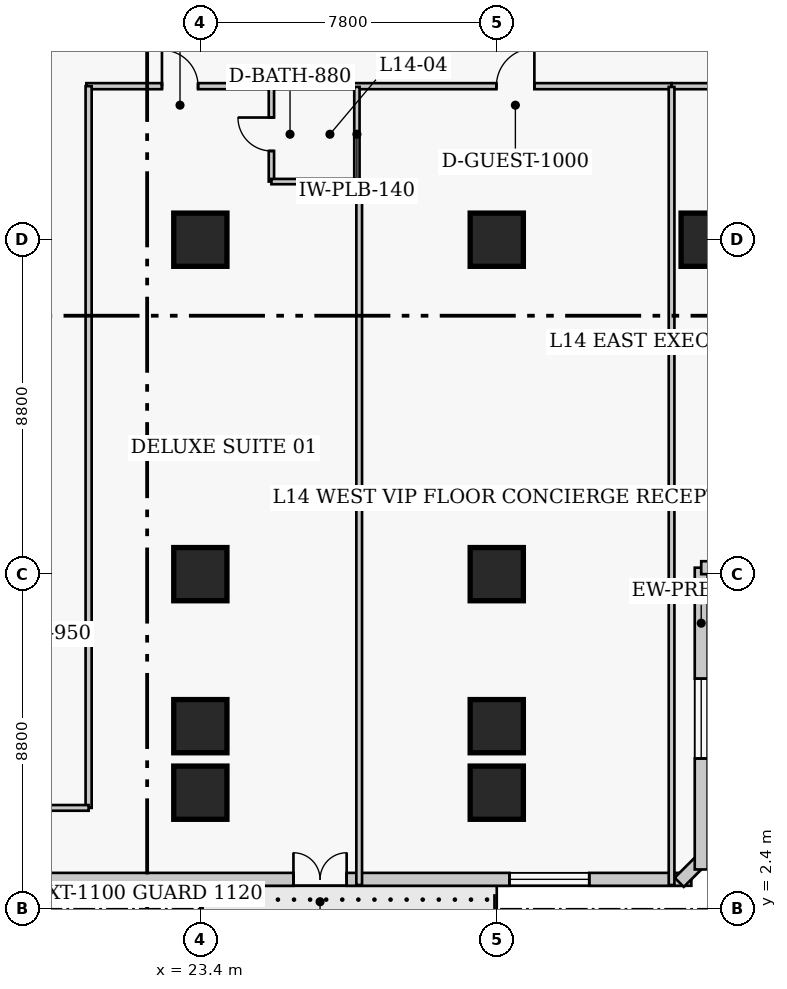
"""IFC4 building model, lengths in metres.
Left out: names, types, materials, properties, quantities, classifications, styles, units other than length and angle.
Written with IfcOpenShell. Run it as: python <this file> out.ifc"""

import sys

from ifc_helpers import new_model, si_unit, direction, frame, frame_2d, origin, origin_2d, place, context, subcontext, project, spatial, rectangle, extrude, element, fill, save


model = new_model("IFC4")
c1 = context("Model", 3, precision=1e-05, world=origin(), true_north=direction((0.0, 1.0)))
c2 = subcontext(c1, "Body", "Model", "MODEL_VIEW")
j1 = project(units=[si_unit("LENGTHUNIT", "METRE"), si_unit("PLANEANGLEUNIT", "RADIAN")], contexts=[c1])
p1 = place(None, origin())
s1 = spatial("IfcSite", under=j1, at=p1, CompositionType="ELEMENT")
p2 = place(p1, origin())
s2 = spatial("IfcBuilding", under=s1, at=p2, CompositionType="ELEMENT")
p3 = place(p2, frame((0.0, 0.0, 60.2)))
s3 = spatial("IfcBuildingStorey", under=s2, at=p3, CompositionType="ELEMENT", Elevation=60.2)
for number, where, z_axis, x_axis in (
    (1, (23.4, 11.2, 0.0), (0.0, 0.0, 1.0), (1.0, 0.0, 0.0)),
    (2, (23.4, 20.0, 0.0), (0.0, 0.0, 1.0), (1.0, 0.0, 0.0)),
    (3, (31.2, 11.2, 0.0), (0.0, 0.0, 1.0), (1.0, 0.0, 0.0)),
    (4, (31.2, 20.0, 0.0), (0.0, 0.0, 1.0), (1.0, 0.0, 0.0)),
    (5, (36.75, 20.0, 0.0), (0.0, 0.0, 1.0), (1.0, 0.0, 0.0)),
    (6, (23.4, 7.2, 0.0), (0.0, 0.0, 1.0), (1.0, 0.0, 0.0)),
    (7, (31.2, 7.2, 0.0), (0.0, 0.0, 1.0), (1.0, 0.0, 0.0)),
    (8, (23.4, 5.45, 0.0), (0.0, 0.0, 1.0), (1.0, 0.0, 0.0)),
    (9, (31.2, 5.45, 0.0), (0.0, 0.0, 1.0), (1.0, 0.0, 0.0)),
):
    element("IfcColumn", number, at=place(p3, frame(where, z_axis=z_axis, x_axis=x_axis)), inside=s3, PredefinedType="COLUMN", context=c2, shape_type="SweptSolid", body=[
        extrude(rectangle(XDim=1.4, YDim=1.4, at=origin_2d()), origin(), (0.0, 0.0, 1.0), 3.8),
    ])
p4 = place(p3, frame((6.43, 3.17, 0.0), z_axis=(0.0, 0.0, 1.0), x_axis=(1.0, 0.0, 0.0)))
e10 = element("IfcWall", 10, at=p4, inside=s3, PredefinedType="SOLIDWALL", context=c2, shape_type="SweptSolid", body=[
    extrude(rectangle(XDim=29.89, YDim=0.34, at=frame_2d((14.945, 0.0))), origin(), (0.0, 0.0, 1.0), 3.54),
])
p5 = place(p4, frame((19.42, 0.0, 0.0)))
e11 = element("IfcOpeningElement", 11, at=p5, cuts=e10, PredefinedType="OPENING", context=c2, shape_type="SweptSolid", body=[
    extrude(rectangle(XDim=1.4, YDim=2.15, at=frame_2d((0.7, 1.075))), frame((0.0, 0.18, 0.0), z_axis=(0.0, -1.0, 0.0), x_axis=(1.0, 0.0, 0.0)), (0.0, 0.0, 1.0), 0.36),
])
p6 = place(p4, frame((2.686, 0.0, 0.85)))
e12 = element("IfcOpeningElement", 12, at=p6, cuts=e10, PredefinedType="OPENING", context=c2, shape_type="SweptSolid", body=[
    extrude(rectangle(XDim=2.1, YDim=1.85, at=frame_2d((1.05, 0.925))), frame((0.0, 0.18, 0.0), z_axis=(0.0, -1.0, 0.0), x_axis=(1.0, 0.0, 0.0)), (0.0, 0.0, 1.0), 0.36),
])
p7 = place(p4, frame((9.009, 0.0, 0.85)))
e13 = element("IfcOpeningElement", 13, at=p7, cuts=e10, PredefinedType="OPENING", context=c2, shape_type="SweptSolid", body=[
    extrude(rectangle(XDim=2.1, YDim=1.85, at=frame_2d((1.05, 0.925))), frame((0.0, 0.18, 0.0), z_axis=(0.0, -1.0, 0.0), x_axis=(1.0, 0.0, 0.0)), (0.0, 0.0, 1.0), 0.36),
])
p8 = place(p4, frame((25.104, 0.0, 0.85)))
e14 = element("IfcOpeningElement", 14, at=p8, cuts=e10, PredefinedType="OPENING", context=c2, shape_type="SweptSolid", body=[
    extrude(rectangle(XDim=2.1, YDim=1.85, at=frame_2d((1.05, 0.925))), frame((0.0, 0.18, 0.0), z_axis=(0.0, -1.0, 0.0), x_axis=(1.0, 0.0, 0.0)), (0.0, 0.0, 1.0), 0.36),
])
p9 = place(p3, frame((36.001, 3.092, 0.0), z_axis=(0.0, 0.0, 1.0), x_axis=(0.707106781187, 0.707106781187, 0.0)))
e15 = element("IfcWall", 15, at=p9, inside=s3, PredefinedType="SOLIDWALL", context=c2, shape_type="SweptSolid", body=[
    extrude(rectangle(XDim=0.929, YDim=0.34, at=frame_2d((0.464, 0.0))), origin(), (0.0, 0.0, 1.0), 3.54),
])
p10 = place(p3, frame((36.58, 3.43, 0.0), z_axis=(0.0, 0.0, 1.0), x_axis=(0.0, 1.0, 0.0)))
e16 = element("IfcWall", 16, at=p10, inside=s3, PredefinedType="SOLIDWALL", context=c2, shape_type="SweptSolid", body=[
    extrude(rectangle(XDim=7.94, YDim=0.34, at=frame_2d((3.97, 0.0))), origin(), (0.0, 0.0, 1.0), 3.54),
])
p11 = place(p10, frame((2.92, 0.0, 0.85)))
e17 = element("IfcOpeningElement", 17, at=p11, cuts=e16, PredefinedType="OPENING", context=c2, shape_type="SweptSolid", body=[
    extrude(rectangle(XDim=2.1, YDim=1.85, at=frame_2d((1.05, 0.925))), frame((0.0, 0.18, 0.0), z_axis=(0.0, -1.0, 0.0), x_axis=(1.0, 0.0, 0.0)), (0.0, 0.0, 1.0), 0.36),
])
p12 = place(p3, frame((36.58, 11.37, 0.0), z_axis=(0.0, 0.0, 1.0), x_axis=(1.0, 0.0, 0.0)))
e18 = element("IfcWall", 18, at=p12, inside=s3, PredefinedType="SOLIDWALL", context=c2, shape_type="SweptSolid", body=[
    extrude(rectangle(XDim=4.84, YDim=0.34, at=frame_2d((2.42, 0.0))), origin(), (0.0, 0.0, 1.0), 3.54),
])
p13 = place(p12, frame((1.37, 0.0, 0.85)))
e19 = element("IfcOpeningElement", 19, at=p13, cuts=e18, PredefinedType="OPENING", context=c2, shape_type="SweptSolid", body=[
    extrude(rectangle(XDim=2.1, YDim=1.85, at=frame_2d((1.05, 0.925))), frame((0.0, 0.18, 0.0), z_axis=(0.0, -1.0, 0.0), x_axis=(1.0, 0.0, 0.0)), (0.0, 0.0, 1.0), 0.36),
])
p14 = place(p3, frame((20.4, 24.04, 0.0), z_axis=(0.0, 0.0, 1.0), x_axis=(1.0, 0.0, 0.0)))
e20 = element("IfcWall", 20, at=p14, inside=s3, PredefinedType="PARTITIONING", context=c2, shape_type="SweptSolid", body=[
    extrude(rectangle(XDim=15.4, YDim=0.16, at=frame_2d((7.7, 0.0))), origin(), (0.0, 0.0, 1.0), 3.54),
])
p15 = place(p14, frame((1.99, 0.0, 0.0)))
e21 = element("IfcOpeningElement", 21, at=p15, cuts=e20, PredefinedType="OPENING", context=c2, shape_type="SweptSolid", body=[
    extrude(rectangle(XDim=0.95, YDim=2.1, at=frame_2d((0.475, 1.05))), frame((0.0, 0.09, 0.0), z_axis=(0.0, -1.0, 0.0), x_axis=(1.0, 0.0, 0.0)), (0.0, 0.0, 1.0), 0.18),
])
p16 = place(p14, frame((10.79, 0.0, 0.0)))
e22 = element("IfcOpeningElement", 22, at=p16, cuts=e20, PredefinedType="OPENING", context=c2, shape_type="SweptSolid", body=[
    extrude(rectangle(XDim=1.0, YDim=2.15, at=frame_2d((0.5, 1.075))), frame((0.0, 0.09, 0.0), z_axis=(0.0, -1.0, 0.0), x_axis=(1.0, 0.0, 0.0)), (0.0, 0.0, 1.0), 0.18),
])
p17 = place(p3, frame((35.8, 24.04, 0.0), z_axis=(0.0, 0.0, 1.0), x_axis=(1.0, 0.0, 0.0)))
e23 = element("IfcWall", 23, at=p17, inside=s3, PredefinedType="PARTITIONING", context=c2, shape_type="SweptSolid", body=[
    extrude(rectangle(XDim=23.5, YDim=0.16, at=frame_2d((11.75, 0.0))), origin(), (0.0, 0.0, 1.0), 3.54),
])
p18 = place(p17, frame((2.705, 0.0, 0.0)))
e24 = element("IfcOpeningElement", 24, at=p18, cuts=e23, PredefinedType="OPENING", context=c2, shape_type="SweptSolid", body=[
    extrude(rectangle(XDim=1.0, YDim=2.15, at=frame_2d((0.5, 1.075))), frame((0.0, 0.09, 0.0), z_axis=(0.0, -1.0, 0.0), x_axis=(1.0, 0.0, 0.0)), (0.0, 0.0, 1.0), 0.18),
])
p19 = place(p17, frame((10.02, 0.0, 0.0)))
e25 = element("IfcOpeningElement", 25, at=p19, cuts=e23, PredefinedType="OPENING", context=c2, shape_type="SweptSolid", body=[
    extrude(rectangle(XDim=0.95, YDim=2.1, at=frame_2d((0.475, 1.05))), frame((0.0, 0.09, 0.0), z_axis=(0.0, -1.0, 0.0), x_axis=(1.0, 0.0, 0.0)), (0.0, 0.0, 1.0), 0.18),
])
p20 = place(p17, frame((15.88, 0.0, 0.0)))
e26 = element("IfcOpeningElement", 26, at=p20, cuts=e23, PredefinedType="OPENING", context=c2, shape_type="SweptSolid", body=[
    extrude(rectangle(XDim=0.95, YDim=2.1, at=frame_2d((0.475, 1.05))), frame((0.0, 0.09, 0.0), z_axis=(0.0, -1.0, 0.0), x_axis=(1.0, 0.0, 0.0)), (0.0, 0.0, 1.0), 0.18),
])
p21 = place(p17, frame((19.155, 0.0, 0.0)))
e27 = element("IfcOpeningElement", 27, at=p21, cuts=e23, PredefinedType="OPENING", context=c2, shape_type="SweptSolid", body=[
    extrude(rectangle(XDim=0.95, YDim=2.1, at=frame_2d((0.475, 1.05))), frame((0.0, 0.09, 0.0), z_axis=(0.0, -1.0, 0.0), x_axis=(1.0, 0.0, 0.0)), (0.0, 0.0, 1.0), 0.18),
])
p22 = place(p3, frame((20.46, 5.05, 0.0), z_axis=(0.0, 0.0, 1.0), x_axis=(0.0, 1.0, 0.0)))
e28 = element("IfcWall", 28, at=p22, inside=s3, PredefinedType="PARTITIONING", context=c2, shape_type="SweptSolid", body=[
    extrude(rectangle(XDim=18.99, YDim=0.16, at=frame_2d((9.495, 0.0))), origin(), (0.0, 0.0, 1.0), 3.54),
])
p23 = place(p3, frame((18.24, 5.05, 0.0), z_axis=(0.0, 0.0, 1.0), x_axis=(1.0, 0.0, 0.0)))
e29 = element("IfcWall", 29, at=p23, inside=s3, PredefinedType="PARTITIONING", context=c2, shape_type="SweptSolid", body=[
    extrude(rectangle(XDim=2.22, YDim=0.15, at=frame_2d((1.11, 0.0))), origin(), (0.0, 0.0, 1.0), 3.54),
])
p24 = place(p3, frame((25.27, 21.53, 0.0), z_axis=(0.0, 0.0, 1.0), x_axis=(0.0, 1.0, 0.0)))
e30 = element("IfcWall", 30, at=p24, inside=s3, PredefinedType="PLUMBINGWALL", context=c2, shape_type="SweptSolid", body=[
    extrude(rectangle(XDim=2.49, YDim=0.14, at=frame_2d((1.245, 0.0))), origin(), (0.0, 0.0, 1.0), 3.54),
])
p25 = place(p24, frame((0.805, 0.0, 0.0)))
e31 = element("IfcOpeningElement", 31, at=p25, cuts=e30, PredefinedType="OPENING", context=c2, shape_type="SweptSolid", body=[
    extrude(rectangle(XDim=0.88, YDim=2.05, at=frame_2d((0.44, 1.025))), frame((0.0, 0.08, 0.0), z_axis=(0.0, -1.0, 0.0), x_axis=(1.0, 0.0, 0.0)), (0.0, 0.0, 1.0), 0.16),
])
p26 = place(p3, frame((27.52, 21.53, 0.0), z_axis=(0.0, 0.0, 1.0), x_axis=(0.0, 1.0, 0.0)))
e32 = element("IfcWall", 32, at=p26, inside=s3, PredefinedType="PLUMBINGWALL", context=c2, shape_type="SweptSolid", body=[
    extrude(rectangle(XDim=2.49, YDim=0.14, at=frame_2d((1.245, 0.0))), origin(), (0.0, 0.0, 1.0), 3.54),
])
p27 = place(p3, frame((25.27, 21.53, 0.0), z_axis=(0.0, 0.0, 1.0), x_axis=(1.0, 0.0, 0.0)))
e33 = element("IfcWall", 33, at=p27, inside=s3, PredefinedType="PLUMBINGWALL", context=c2, shape_type="SweptSolid", body=[
    extrude(rectangle(XDim=2.25, YDim=0.14, at=frame_2d((1.125, 0.0))), origin(), (0.0, 0.0, 1.0), 3.54),
])
p28 = place(p3, frame((27.58, 3.02, 0.0), z_axis=(0.0, 0.0, 1.0), x_axis=(0.0, 1.0, 0.0)))
e34 = element("IfcWall", 34, at=p28, inside=s3, PredefinedType="PARTITIONING", context=c2, shape_type="SweptSolid", body=[
    extrude(rectangle(XDim=18.51, YDim=0.15, at=frame_2d((9.255, 0.0))), origin(), (0.0, 0.0, 1.0), 3.54),
])
p29 = place(p3, frame((35.8, 3.02, 0.0), z_axis=(0.0, 0.0, 1.0), x_axis=(0.0, 1.0, 0.0)))
e35 = element("IfcWall", 35, at=p29, inside=s3, PredefinedType="PARTITIONING", context=c2, shape_type="SweptSolid", body=[
    extrude(rectangle(XDim=21.0, YDim=0.15, at=frame_2d((10.5, 0.0))), origin(), (0.0, 0.0, 1.0), 3.54),
])
p30 = place(p5, origin())
e36 = element("IfcDoor", 36, at=p30, inside=s3, OperationType="DOUBLE_DOOR_SINGLE_SWING", PredefinedType="DOOR", context=c2, shape_type="SweptSolid", body=[
    extrude(rectangle(XDim=1.4, YDim=2.15, at=frame_2d((0.7, 1.075))), frame((0.0, 0.025, 0.0), z_axis=(0.0, -1.0, 0.0), x_axis=(1.0, 0.0, 0.0)), (0.0, 0.0, 1.0), 0.05),
])
fill(e11, e36)
p31 = place(p8, origin())
e37 = element("IfcWindow", 37, at=p31, inside=s3, PartitioningType="SINGLE_PANEL", PredefinedType="WINDOW", context=c2, shape_type="SweptSolid", body=[
    extrude(rectangle(XDim=2.1, YDim=1.85, at=frame_2d((1.05, 0.925))), frame((0.0, 0.03, 0.0), z_axis=(0.0, -1.0, 0.0), x_axis=(1.0, 0.0, 0.0)), (0.0, 0.0, 1.0), 0.06),
])
fill(e14, e37)
p32 = place(p11, origin())
e38 = element("IfcWindow", 38, at=p32, inside=s3, PartitioningType="SINGLE_PANEL", PredefinedType="WINDOW", context=c2, shape_type="SweptSolid", body=[
    extrude(rectangle(XDim=2.1, YDim=1.85, at=frame_2d((1.05, 0.925))), frame((0.0, 0.03, 0.0), z_axis=(0.0, -1.0, 0.0), x_axis=(1.0, 0.0, 0.0)), (0.0, 0.0, 1.0), 0.06),
])
fill(e17, e38)
p33 = place(p25, origin())
e39 = element("IfcDoor", 39, at=p33, inside=s3, OperationType="SINGLE_SWING_RIGHT", PredefinedType="DOOR", context=c2, shape_type="SweptSolid", body=[
    extrude(rectangle(XDim=0.88, YDim=2.05, at=frame_2d((0.44, 1.025))), frame((0.0, 0.025, 0.0), z_axis=(0.0, -1.0, 0.0), x_axis=(1.0, 0.0, 0.0)), (0.0, 0.0, 1.0), 0.05),
])
fill(e31, e39)
p34 = place(p15, origin())
e40 = element("IfcDoor", 40, at=p34, inside=s3, OperationType="SINGLE_SWING_LEFT", PredefinedType="DOOR", context=c2, shape_type="SweptSolid", body=[
    extrude(rectangle(XDim=0.95, YDim=2.1, at=frame_2d((0.475, 1.05))), frame((0.0, 0.025, 0.0), z_axis=(0.0, -1.0, 0.0), x_axis=(1.0, 0.0, 0.0)), (0.0, 0.0, 1.0), 0.05),
])
fill(e21, e40)
p35 = place(p16, origin())
e41 = element("IfcDoor", 41, at=p35, inside=s3, OperationType="SINGLE_SWING_RIGHT", PredefinedType="DOOR", context=c2, shape_type="SweptSolid", body=[
    extrude(rectangle(XDim=1.0, YDim=2.15, at=frame_2d((0.5, 1.075))), frame((0.0, 0.025, 0.0), z_axis=(0.0, -1.0, 0.0), x_axis=(1.0, 0.0, 0.0)), (0.0, 0.0, 1.0), 0.05),
])
fill(e22, e41)
save(model, sys.argv[1])
